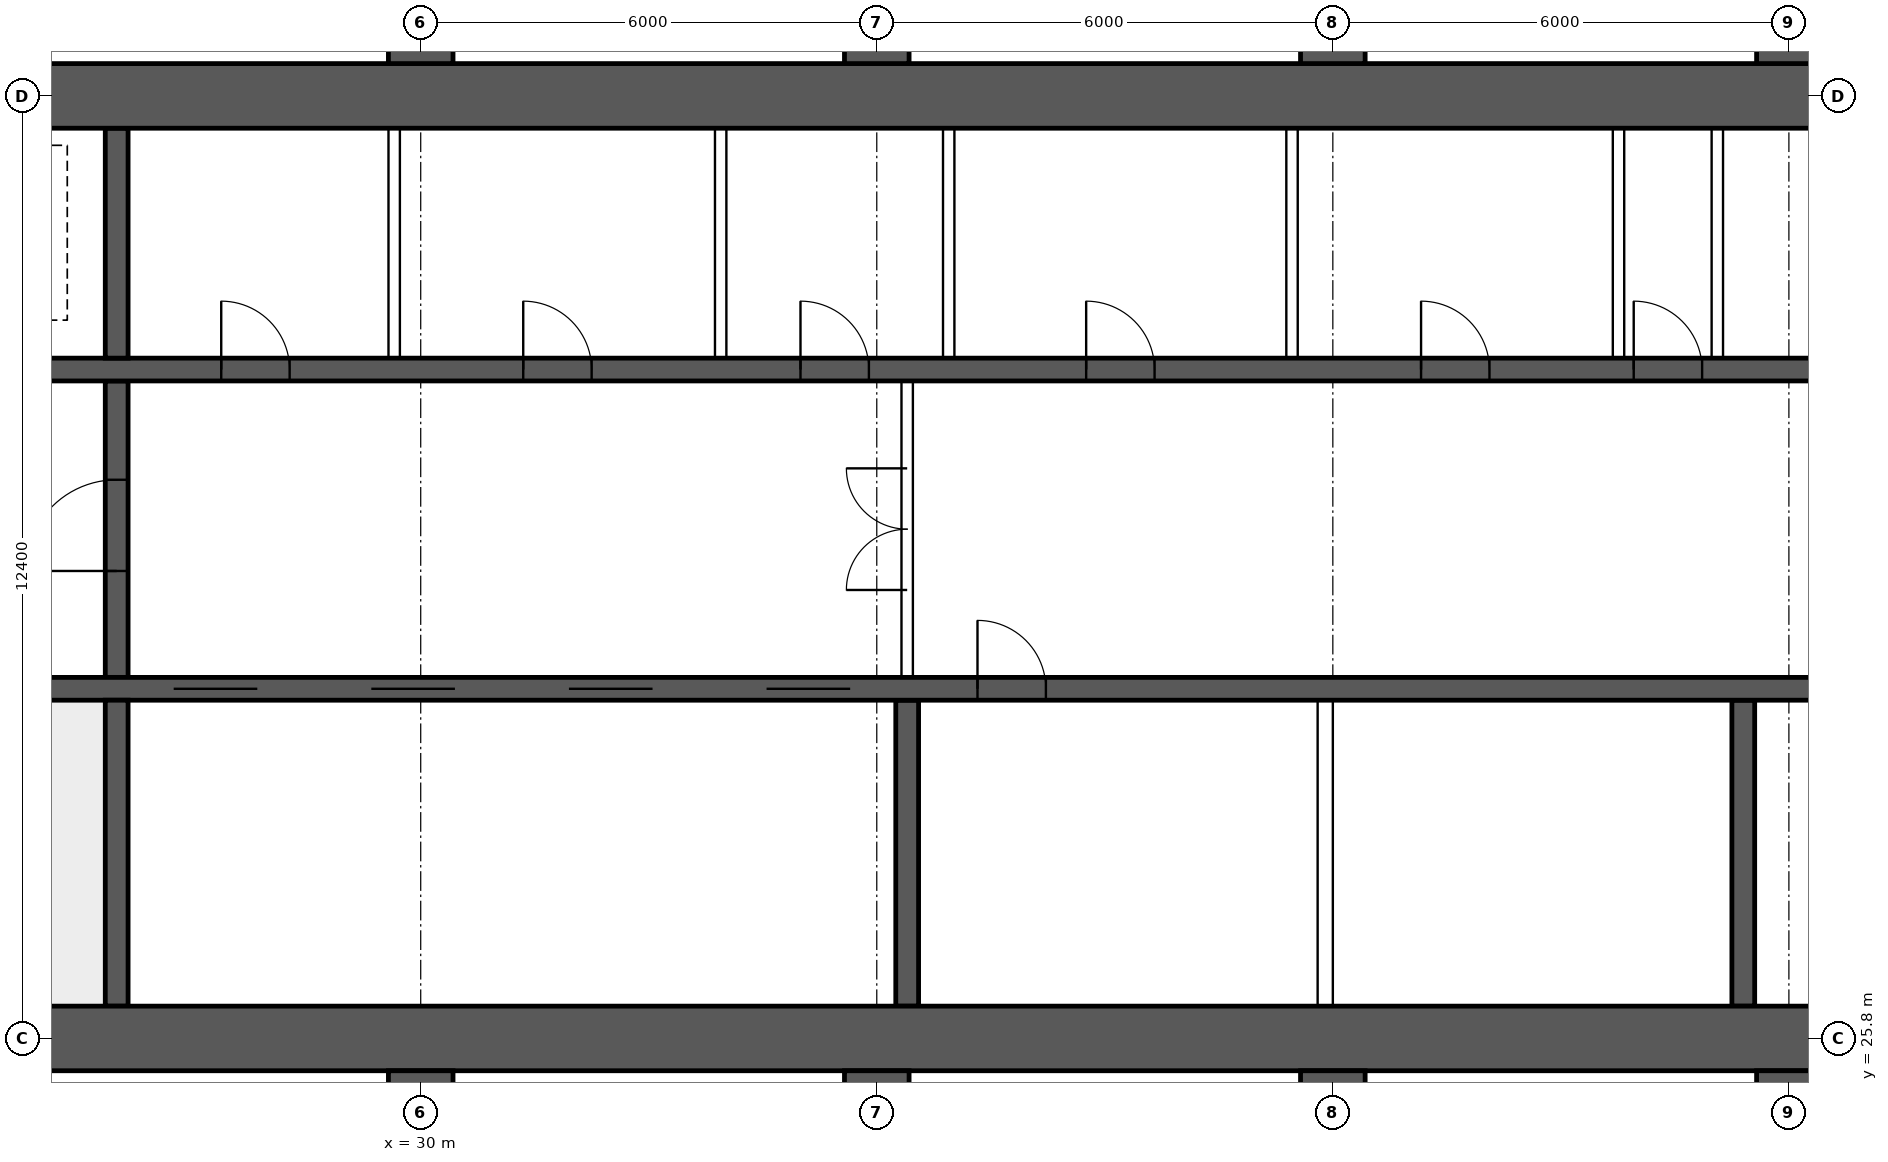
"""IFC4 building model, lengths in metres.
Left out: names, types, materials, properties, quantities, classifications, styles, units other than length and angle.
Written with IfcOpenShell. Run it as: python <this file> out.ifc"""

import sys

from ifc_helpers import new_model, si_unit, direction, frame, frame_2d, origin, place, context, subcontext, project, spatial, rectangle, extrude, element, fill, save


model = new_model("IFC4")
c1 = context("Model", 3, precision=1e-05, world=origin(), true_north=direction((0.0, 1.0)))
c2 = subcontext(c1, "Body", "Model", "MODEL_VIEW")
j1 = project(units=[si_unit("LENGTHUNIT", "METRE"), si_unit("PLANEANGLEUNIT", "RADIAN")], contexts=[c1])
p1 = place(None, origin())
s1 = spatial("IfcSite", under=j1, at=p1, CompositionType="ELEMENT")
p2 = place(p1, origin())
s2 = spatial("IfcBuilding", under=s1, at=p2, CompositionType="ELEMENT")
p3 = place(p2, frame((0.0, 0.0, 186.1)))
s3 = spatial("IfcBuildingStorey", under=s2, at=p3, CompositionType="ELEMENT", Elevation=186.1)
for number, where, z_axis, x_axis in (
    (1, (18.0, 25.8, 0.0), (0.0, 0.0, 1.0), (1.0, 0.0, 0.0)),
    (2, (18.0, 38.2, 0.0), (0.0, 0.0, 1.0), (1.0, 0.0, 0.0)),
):
    element("IfcWall", number, at=place(p3, frame(where, z_axis=z_axis, x_axis=x_axis)), inside=s3, PredefinedType="SHEAR", context=c2, shape_type="SweptSolid", body=[
        extrude(rectangle(XDim=48.0, YDim=0.85, at=frame_2d((24.0, 0.0))), origin(), (0.0, 0.0, 1.0), 3.75),
    ])
p4 = place(p3, frame((18.425, 30.4, 0.0), z_axis=(0.0, 0.0, 1.0), x_axis=(1.0, 0.0, 0.0)))
e3 = element("IfcWall", 3, at=p4, inside=s3, PredefinedType="SHEAR", context=c2, shape_type="SweptSolid", body=[
    extrude(rectangle(XDim=47.15, YDim=0.3, at=frame_2d((23.575, 0.0))), origin(), (0.0, 0.0, 1.0), 3.75),
])
p5 = place(p4, frame((0.4, 0.0, 0.0)))
e4 = element("IfcOpeningElement", 4, at=p5, cuts=e3, PredefinedType="OPENING", context=c2, shape_type="SweptSolid", body=[
    extrude(rectangle(XDim=1.0, YDim=2.1, at=frame_2d((0.5, 1.05))), frame((0.0, 0.16, 0.0), z_axis=(0.0, -1.0, 0.0), x_axis=(1.0, 0.0, 0.0)), (0.0, 0.0, 1.0), 0.32),
])
p6 = place(p4, frame((45.75, 0.0, 0.0)))
e5 = element("IfcOpeningElement", 5, at=p6, cuts=e3, PredefinedType="OPENING", context=c2, shape_type="SweptSolid", body=[
    extrude(rectangle(XDim=1.0, YDim=2.1, at=frame_2d((0.5, 1.05))), frame((0.0, 0.16, 0.0), z_axis=(0.0, -1.0, 0.0), x_axis=(1.0, 0.0, 0.0)), (0.0, 0.0, 1.0), 0.32),
])
p7 = place(p4, frame((8.325, 0.0, 0.0)))
e6 = element("IfcOpeningElement", 6, at=p7, cuts=e3, PredefinedType="OPENING", context=c2, shape_type="SweptSolid", body=[
    extrude(rectangle(XDim=1.1, YDim=2.1, at=frame_2d((0.55, 1.05))), frame((0.0, 0.16, 0.0), z_axis=(0.0, -1.0, 0.0), x_axis=(1.0, 0.0, 0.0)), (0.0, 0.0, 1.0), 0.32),
])
p8 = place(p4, frame((10.925, 0.0, 0.0)))
e7 = element("IfcOpeningElement", 7, at=p8, cuts=e3, PredefinedType="OPENING", context=c2, shape_type="SweptSolid", body=[
    extrude(rectangle(XDim=1.1, YDim=2.1, at=frame_2d((0.55, 1.05))), frame((0.0, 0.16, 0.0), z_axis=(0.0, -1.0, 0.0), x_axis=(1.0, 0.0, 0.0)), (0.0, 0.0, 1.0), 0.32),
])
p9 = place(p4, frame((13.525, 0.0, 0.0)))
e8 = element("IfcOpeningElement", 8, at=p9, cuts=e3, PredefinedType="OPENING", context=c2, shape_type="SweptSolid", body=[
    extrude(rectangle(XDim=1.1, YDim=2.1, at=frame_2d((0.55, 1.05))), frame((0.0, 0.16, 0.0), z_axis=(0.0, -1.0, 0.0), x_axis=(1.0, 0.0, 0.0)), (0.0, 0.0, 1.0), 0.32),
])
p10 = place(p4, frame((16.125, 0.0, 0.0)))
e9 = element("IfcOpeningElement", 9, at=p10, cuts=e3, PredefinedType="OPENING", context=c2, shape_type="SweptSolid", body=[
    extrude(rectangle(XDim=1.1, YDim=2.1, at=frame_2d((0.55, 1.05))), frame((0.0, 0.16, 0.0), z_axis=(0.0, -1.0, 0.0), x_axis=(1.0, 0.0, 0.0)), (0.0, 0.0, 1.0), 0.32),
])
p11 = place(p4, frame((18.9, 0.0, 0.0)))
e10 = element("IfcOpeningElement", 10, at=p11, cuts=e3, PredefinedType="OPENING", context=c2, shape_type="SweptSolid", body=[
    extrude(rectangle(XDim=0.9, YDim=2.1, at=frame_2d((0.45, 1.05))), frame((0.0, 0.16, 0.0), z_axis=(0.0, -1.0, 0.0), x_axis=(1.0, 0.0, 0.0)), (0.0, 0.0, 1.0), 0.32),
])
p12 = place(p4, frame((30.192, 0.0, 0.0)))
e11 = element("IfcOpeningElement", 11, at=p12, cuts=e3, PredefinedType="OPENING", context=c2, shape_type="SweptSolid", body=[
    extrude(rectangle(XDim=1.1, YDim=2.1, at=frame_2d((0.55, 1.05))), frame((0.0, 0.16, 0.0), z_axis=(0.0, -1.0, 0.0), x_axis=(1.0, 0.0, 0.0)), (0.0, 0.0, 1.0), 0.32),
])
p13 = place(p4, frame((33.725, 0.0, 0.0)))
e12 = element("IfcOpeningElement", 12, at=p13, cuts=e3, PredefinedType="OPENING", context=c2, shape_type="SweptSolid", body=[
    extrude(rectangle(XDim=1.1, YDim=2.1, at=frame_2d((0.55, 1.05))), frame((0.0, 0.16, 0.0), z_axis=(0.0, -1.0, 0.0), x_axis=(1.0, 0.0, 0.0)), (0.0, 0.0, 1.0), 0.32),
])
p14 = place(p4, frame((37.258, 0.0, 0.0)))
e13 = element("IfcOpeningElement", 13, at=p14, cuts=e3, PredefinedType="OPENING", context=c2, shape_type="SweptSolid", body=[
    extrude(rectangle(XDim=1.1, YDim=2.1, at=frame_2d((0.55, 1.05))), frame((0.0, 0.16, 0.0), z_axis=(0.0, -1.0, 0.0), x_axis=(1.0, 0.0, 0.0)), (0.0, 0.0, 1.0), 0.32),
])
p15 = place(p3, frame((18.425, 34.6, 0.0), z_axis=(0.0, 0.0, 1.0), x_axis=(1.0, 0.0, 0.0)))
e14 = element("IfcWall", 14, at=p15, inside=s3, PredefinedType="SHEAR", context=c2, shape_type="SweptSolid", body=[
    extrude(rectangle(XDim=47.15, YDim=0.3, at=frame_2d((23.575, 0.0))), origin(), (0.0, 0.0, 1.0), 3.75),
])
p16 = place(p15, frame((0.9, 0.0, 0.0)))
e15 = element("IfcOpeningElement", 15, at=p16, cuts=e14, PredefinedType="OPENING", context=c2, shape_type="SweptSolid", body=[
    extrude(rectangle(XDim=1.1, YDim=2.1, at=frame_2d((0.55, 1.05))), frame((0.0, 0.16, 0.0), z_axis=(0.0, -1.0, 0.0), x_axis=(1.0, 0.0, 0.0)), (0.0, 0.0, 1.0), 0.32),
])
p17 = place(p15, frame((45.15, 0.0, 0.0)))
e16 = element("IfcOpeningElement", 16, at=p17, cuts=e14, PredefinedType="OPENING", context=c2, shape_type="SweptSolid", body=[
    extrude(rectangle(XDim=1.1, YDim=2.1, at=frame_2d((0.55, 1.05))), frame((0.0, 0.16, 0.0), z_axis=(0.0, -1.0, 0.0), x_axis=(1.0, 0.0, 0.0)), (0.0, 0.0, 1.0), 0.32),
])
p18 = place(p15, frame((4.175, 0.0, 0.0)))
e17 = element("IfcOpeningElement", 17, at=p18, cuts=e14, PredefinedType="OPENING", context=c2, shape_type="SweptSolid", body=[
    extrude(rectangle(XDim=0.9, YDim=2.1, at=frame_2d((0.45, 1.05))), frame((0.0, 0.16, 0.0), z_axis=(0.0, -1.0, 0.0), x_axis=(1.0, 0.0, 0.0)), (0.0, 0.0, 1.0), 0.32),
])
p19 = place(p15, frame((42.075, 0.0, 0.0)))
e18 = element("IfcOpeningElement", 18, at=p19, cuts=e14, PredefinedType="OPENING", context=c2, shape_type="SweptSolid", body=[
    extrude(rectangle(XDim=0.9, YDim=2.1, at=frame_2d((0.45, 1.05))), frame((0.0, 0.16, 0.0), z_axis=(0.0, -1.0, 0.0), x_axis=(1.0, 0.0, 0.0)), (0.0, 0.0, 1.0), 0.32),
])
p20 = place(p15, frame((8.95, 0.0, 0.0)))
e19 = element("IfcOpeningElement", 19, at=p20, cuts=e14, PredefinedType="OPENING", context=c2, shape_type="SweptSolid", body=[
    extrude(rectangle(XDim=0.9, YDim=2.1, at=frame_2d((0.45, 1.05))), frame((0.0, 0.16, 0.0), z_axis=(0.0, -1.0, 0.0), x_axis=(1.0, 0.0, 0.0)), (0.0, 0.0, 1.0), 0.32),
])
p21 = place(p15, frame((12.924, 0.0, 0.0)))
e20 = element("IfcOpeningElement", 20, at=p21, cuts=e14, PredefinedType="OPENING", context=c2, shape_type="SweptSolid", body=[
    extrude(rectangle(XDim=0.9, YDim=2.1, at=frame_2d((0.45, 1.05))), frame((0.0, 0.16, 0.0), z_axis=(0.0, -1.0, 0.0), x_axis=(1.0, 0.0, 0.0)), (0.0, 0.0, 1.0), 0.32),
])
p22 = place(p15, frame((16.571, 0.0, 0.0)))
e21 = element("IfcOpeningElement", 21, at=p22, cuts=e14, PredefinedType="OPENING", context=c2, shape_type="SweptSolid", body=[
    extrude(rectangle(XDim=0.9, YDim=2.1, at=frame_2d((0.45, 1.05))), frame((0.0, 0.16, 0.0), z_axis=(0.0, -1.0, 0.0), x_axis=(1.0, 0.0, 0.0)), (0.0, 0.0, 1.0), 0.32),
])
p23 = place(p15, frame((20.33, 0.0, 0.0)))
e22 = element("IfcOpeningElement", 22, at=p23, cuts=e14, PredefinedType="OPENING", context=c2, shape_type="SweptSolid", body=[
    extrude(rectangle(XDim=0.9, YDim=2.1, at=frame_2d((0.45, 1.05))), frame((0.0, 0.16, 0.0), z_axis=(0.0, -1.0, 0.0), x_axis=(1.0, 0.0, 0.0)), (0.0, 0.0, 1.0), 0.32),
])
p24 = place(p15, frame((24.736, 0.0, 0.0)))
e23 = element("IfcOpeningElement", 23, at=p24, cuts=e14, PredefinedType="OPENING", context=c2, shape_type="SweptSolid", body=[
    extrude(rectangle(XDim=0.9, YDim=2.1, at=frame_2d((0.45, 1.05))), frame((0.0, 0.16, 0.0), z_axis=(0.0, -1.0, 0.0), x_axis=(1.0, 0.0, 0.0)), (0.0, 0.0, 1.0), 0.32),
])
p25 = place(p15, frame((27.533, 0.0, 0.0)))
e24 = element("IfcOpeningElement", 24, at=p25, cuts=e14, PredefinedType="OPENING", context=c2, shape_type="SweptSolid", body=[
    extrude(rectangle(XDim=0.9, YDim=2.1, at=frame_2d((0.45, 1.05))), frame((0.0, 0.16, 0.0), z_axis=(0.0, -1.0, 0.0), x_axis=(1.0, 0.0, 0.0)), (0.0, 0.0, 1.0), 0.32),
])
p26 = place(p15, frame((30.716, 0.0, 0.0)))
e25 = element("IfcOpeningElement", 25, at=p26, cuts=e14, PredefinedType="OPENING", context=c2, shape_type="SweptSolid", body=[
    extrude(rectangle(XDim=0.9, YDim=2.1, at=frame_2d((0.45, 1.05))), frame((0.0, 0.16, 0.0), z_axis=(0.0, -1.0, 0.0), x_axis=(1.0, 0.0, 0.0)), (0.0, 0.0, 1.0), 0.32),
])
p27 = place(p15, frame((34.667, 0.0, 0.0)))
e26 = element("IfcOpeningElement", 26, at=p27, cuts=e14, PredefinedType="OPENING", context=c2, shape_type="SweptSolid", body=[
    extrude(rectangle(XDim=0.9, YDim=2.1, at=frame_2d((0.45, 1.05))), frame((0.0, 0.16, 0.0), z_axis=(0.0, -1.0, 0.0), x_axis=(1.0, 0.0, 0.0)), (0.0, 0.0, 1.0), 0.32),
])
p28 = place(p15, frame((37.605, 0.0, 0.0)))
e27 = element("IfcOpeningElement", 27, at=p28, cuts=e14, PredefinedType="OPENING", context=c2, shape_type="SweptSolid", body=[
    extrude(rectangle(XDim=0.9, YDim=2.1, at=frame_2d((0.45, 1.05))), frame((0.0, 0.16, 0.0), z_axis=(0.0, -1.0, 0.0), x_axis=(1.0, 0.0, 0.0)), (0.0, 0.0, 1.0), 0.32),
])
p29 = place(p3, frame((26.0, 26.225, 0.0), z_axis=(0.0, 0.0, 1.0), x_axis=(0.0, 1.0, 0.0)))
e28 = element("IfcWall", 28, at=p29, inside=s3, PredefinedType="SHEAR", context=c2, shape_type="SweptSolid", body=[
    extrude(rectangle(XDim=4.025, YDim=0.3, at=frame_2d((2.012, 0.0))), origin(), (0.0, 0.0, 1.0), 3.75),
])
p30 = place(p3, frame((26.0, 30.55, 0.0), z_axis=(0.0, 0.0, 1.0), x_axis=(0.0, 1.0, 0.0)))
e29 = element("IfcWall", 29, at=p30, inside=s3, PredefinedType="SHEAR", context=c2, shape_type="SweptSolid", body=[
    extrude(rectangle(XDim=3.9, YDim=0.3, at=frame_2d((1.95, 0.0))), origin(), (0.0, 0.0, 1.0), 3.75),
])
p31 = place(p30, frame((1.4, 0.0, 0.0)))
e30 = element("IfcOpeningElement", 30, at=p31, cuts=e29, PredefinedType="OPENING", context=c2, shape_type="SweptSolid", body=[
    extrude(rectangle(XDim=1.2, YDim=2.1, at=frame_2d((0.6, 1.05))), frame((0.0, 0.16, 0.0), z_axis=(0.0, -1.0, 0.0), x_axis=(1.0, 0.0, 0.0)), (0.0, 0.0, 1.0), 0.32),
])
p32 = place(p3, frame((26.0, 34.75, 0.0), z_axis=(0.0, 0.0, 1.0), x_axis=(0.0, 1.0, 0.0)))
e31 = element("IfcWall", 31, at=p32, inside=s3, PredefinedType="SHEAR", context=c2, shape_type="SweptSolid", body=[
    extrude(rectangle(XDim=3.025, YDim=0.3, at=frame_2d((1.512, 0.0))), origin(), (0.0, 0.0, 1.0), 3.75),
])
for number, where, z_axis, x_axis in (
    (32, (36.4, 26.225, 0.0), (0.0, 0.0, 1.0), (0.0, 1.0, 0.0)),
    (33, (47.4, 26.225, 0.0), (0.0, 0.0, 1.0), (0.0, 1.0, 0.0)),
):
    element("IfcWall", number, at=place(p3, frame(where, z_axis=z_axis, x_axis=x_axis)), inside=s3, PredefinedType="SHEAR", context=c2, shape_type="SweptSolid", body=[
        extrude(rectangle(XDim=4.025, YDim=0.3, at=frame_2d((2.012, 0.0))), origin(), (0.0, 0.0, 1.0), 3.75),
    ])
for number, where, z_axis, x_axis in (
    (34, (30.0, 17.2, 0.0), (0.0, 0.0, 1.0), (0.0, 1.0, 0.0)),
    (35, (30.0, 38.625, 0.0), (0.0, 0.0, 1.0), (0.0, 1.0, 0.0)),
    (36, (36.0, 17.2, 0.0), (0.0, 0.0, 1.0), (0.0, 1.0, 0.0)),
    (37, (36.0, 38.625, 0.0), (0.0, 0.0, 1.0), (0.0, 1.0, 0.0)),
    (38, (42.0, 17.2, 0.0), (0.0, 0.0, 1.0), (0.0, 1.0, 0.0)),
    (39, (42.0, 38.625, 0.0), (0.0, 0.0, 1.0), (0.0, 1.0, 0.0)),
    (40, (48.0, 17.2, 0.0), (0.0, 0.0, 1.0), (0.0, 1.0, 0.0)),
    (41, (48.0, 38.625, 0.0), (0.0, 0.0, 1.0), (0.0, 1.0, 0.0)),
):
    element("IfcWall", number, at=place(p3, frame(where, z_axis=z_axis, x_axis=x_axis)), inside=s3, PredefinedType="SHEAR", context=c2, shape_type="SweptSolid", body=[
        extrude(rectangle(XDim=8.175, YDim=0.85, at=frame_2d((4.087, 0.0))), origin(), (0.0, 0.0, 1.0), 3.75),
    ])
p33 = place(p3, frame((36.4, 30.55, 0.0), z_axis=(0.0, 0.0, 1.0), x_axis=(0.0, 1.0, 0.0)))
e42 = element("IfcWall", 42, at=p33, inside=s3, PredefinedType="SOLIDWALL", context=c2, shape_type="SweptSolid", body=[
    extrude(rectangle(XDim=3.9, YDim=0.15, at=frame_2d((1.95, 0.0))), origin(), (0.0, 0.0, 1.0), 3.5),
])
p34 = place(p33, frame((1.15, 0.0, 0.0)))
e43 = element("IfcOpeningElement", 43, at=p34, cuts=e42, PredefinedType="OPENING", context=c2, shape_type="SweptSolid", body=[
    extrude(rectangle(XDim=1.6, YDim=2.1, at=frame_2d((0.8, 1.05))), frame((0.0, 0.085, 0.0), z_axis=(0.0, -1.0, 0.0), x_axis=(1.0, 0.0, 0.0)), (0.0, 0.0, 1.0), 0.17),
])
for number, where, z_axis, x_axis in (
    (44, (29.651, 34.75, 0.0), (0.0, 0.0, 1.0), (0.0, 1.0, 0.0)),
    (45, (33.946, 34.75, 0.0), (0.0, 0.0, 1.0), (0.0, 1.0, 0.0)),
    (46, (36.946, 34.75, 0.0), (0.0, 0.0, 1.0), (0.0, 1.0, 0.0)),
    (47, (41.463, 34.75, 0.0), (0.0, 0.0, 1.0), (0.0, 1.0, 0.0)),
    (48, (45.758, 34.75, 0.0), (0.0, 0.0, 1.0), (0.0, 1.0, 0.0)),
    (49, (47.058, 34.75, 0.0), (0.0, 0.0, 1.0), (0.0, 1.0, 0.0)),
):
    element("IfcWall", number, at=place(p3, frame(where, z_axis=z_axis, x_axis=x_axis)), inside=s3, PredefinedType="SOLIDWALL", context=c2, shape_type="SweptSolid", body=[
        extrude(rectangle(XDim=3.025, YDim=0.15, at=frame_2d((1.512, 0.0))), origin(), (0.0, 0.0, 1.0), 3.5),
    ])
p35 = place(p3, frame((41.9, 26.225, 0.0), z_axis=(0.0, 0.0, 1.0), x_axis=(0.0, 1.0, 0.0)))
e50 = element("IfcWall", 50, at=p35, inside=s3, PredefinedType="SOLIDWALL", context=c2, shape_type="SweptSolid", body=[
    extrude(rectangle(XDim=4.025, YDim=0.2, at=frame_2d((2.012, 0.0))), origin(), (0.0, 0.0, 1.0), 3.5),
])
p36 = place(p34, origin())
e51 = element("IfcDoor", 51, at=p36, inside=s3, OperationType="DOUBLE_DOOR_SINGLE_SWING", PredefinedType="DOOR", context=c2, shape_type="SweptSolid", body=[
    extrude(rectangle(XDim=1.6, YDim=2.1, at=frame_2d((0.8, 1.05))), frame((0.0, 0.025, 0.0), z_axis=(0.0, -1.0, 0.0), x_axis=(1.0, 0.0, 0.0)), (0.0, 0.0, 1.0), 0.05),
])
fill(e43, e51)
p37 = place(p31, origin())
e52 = element("IfcDoor", 52, at=p37, inside=s3, OperationType="SINGLE_SWING_LEFT", PredefinedType="DOOR", context=c2, shape_type="SweptSolid", body=[
    extrude(rectangle(XDim=1.2, YDim=2.1, at=frame_2d((0.6, 1.05))), frame((0.0, 0.025, 0.0), z_axis=(0.0, -1.0, 0.0), x_axis=(1.0, 0.0, 0.0)), (0.0, 0.0, 1.0), 0.05),
])
fill(e30, e52)
p38 = place(p20, origin())
e53 = element("IfcDoor", 53, at=p38, inside=s3, OperationType="SINGLE_SWING_LEFT", PredefinedType="DOOR", context=c2, shape_type="SweptSolid", body=[
    extrude(rectangle(XDim=0.9, YDim=2.1, at=frame_2d((0.45, 1.05))), frame((0.0, 0.025, 0.0), z_axis=(0.0, -1.0, 0.0), x_axis=(1.0, 0.0, 0.0)), (0.0, 0.0, 1.0), 0.05),
])
fill(e19, e53)
p39 = place(p21, origin())
e54 = element("IfcDoor", 54, at=p39, inside=s3, OperationType="SINGLE_SWING_LEFT", PredefinedType="DOOR", context=c2, shape_type="SweptSolid", body=[
    extrude(rectangle(XDim=0.9, YDim=2.1, at=frame_2d((0.45, 1.05))), frame((0.0, 0.025, 0.0), z_axis=(0.0, -1.0, 0.0), x_axis=(1.0, 0.0, 0.0)), (0.0, 0.0, 1.0), 0.05),
])
fill(e20, e54)
p40 = place(p22, origin())
e55 = element("IfcDoor", 55, at=p40, inside=s3, OperationType="SINGLE_SWING_LEFT", PredefinedType="DOOR", context=c2, shape_type="SweptSolid", body=[
    extrude(rectangle(XDim=0.9, YDim=2.1, at=frame_2d((0.45, 1.05))), frame((0.0, 0.025, 0.0), z_axis=(0.0, -1.0, 0.0), x_axis=(1.0, 0.0, 0.0)), (0.0, 0.0, 1.0), 0.05),
])
fill(e21, e55)
p41 = place(p23, origin())
e56 = element("IfcDoor", 56, at=p41, inside=s3, OperationType="SINGLE_SWING_LEFT", PredefinedType="DOOR", context=c2, shape_type="SweptSolid", body=[
    extrude(rectangle(XDim=0.9, YDim=2.1, at=frame_2d((0.45, 1.05))), frame((0.0, 0.025, 0.0), z_axis=(0.0, -1.0, 0.0), x_axis=(1.0, 0.0, 0.0)), (0.0, 0.0, 1.0), 0.05),
])
fill(e22, e56)
p42 = place(p24, origin())
e57 = element("IfcDoor", 57, at=p42, inside=s3, OperationType="SINGLE_SWING_LEFT", PredefinedType="DOOR", context=c2, shape_type="SweptSolid", body=[
    extrude(rectangle(XDim=0.9, YDim=2.1, at=frame_2d((0.45, 1.05))), frame((0.0, 0.025, 0.0), z_axis=(0.0, -1.0, 0.0), x_axis=(1.0, 0.0, 0.0)), (0.0, 0.0, 1.0), 0.05),
])
fill(e23, e57)
p43 = place(p25, origin())
e58 = element("IfcDoor", 58, at=p43, inside=s3, OperationType="SINGLE_SWING_LEFT", PredefinedType="DOOR", context=c2, shape_type="SweptSolid", body=[
    extrude(rectangle(XDim=0.9, YDim=2.1, at=frame_2d((0.45, 1.05))), frame((0.0, 0.025, 0.0), z_axis=(0.0, -1.0, 0.0), x_axis=(1.0, 0.0, 0.0)), (0.0, 0.0, 1.0), 0.05),
])
fill(e24, e58)
p44 = place(p7, origin())
e59 = element("IfcDoor", 59, at=p44, inside=s3, OperationType="DOUBLE_DOOR_SLIDING", PredefinedType="DOOR", context=c2, shape_type="SweptSolid", body=[
    extrude(rectangle(XDim=1.1, YDim=2.1, at=frame_2d((0.55, 1.05))), frame((0.0, 0.025, 0.0), z_axis=(0.0, -1.0, 0.0), x_axis=(1.0, 0.0, 0.0)), (0.0, 0.0, 1.0), 0.05),
])
fill(e6, e59)
p45 = place(p8, origin())
e60 = element("IfcDoor", 60, at=p45, inside=s3, OperationType="DOUBLE_DOOR_SLIDING", PredefinedType="DOOR", context=c2, shape_type="SweptSolid", body=[
    extrude(rectangle(XDim=1.1, YDim=2.1, at=frame_2d((0.55, 1.05))), frame((0.0, 0.025, 0.0), z_axis=(0.0, -1.0, 0.0), x_axis=(1.0, 0.0, 0.0)), (0.0, 0.0, 1.0), 0.05),
])
fill(e7, e60)
p46 = place(p9, origin())
e61 = element("IfcDoor", 61, at=p46, inside=s3, OperationType="DOUBLE_DOOR_SLIDING", PredefinedType="DOOR", context=c2, shape_type="SweptSolid", body=[
    extrude(rectangle(XDim=1.1, YDim=2.1, at=frame_2d((0.55, 1.05))), frame((0.0, 0.025, 0.0), z_axis=(0.0, -1.0, 0.0), x_axis=(1.0, 0.0, 0.0)), (0.0, 0.0, 1.0), 0.05),
])
fill(e8, e61)
p47 = place(p10, origin())
e62 = element("IfcDoor", 62, at=p47, inside=s3, OperationType="DOUBLE_DOOR_SLIDING", PredefinedType="DOOR", context=c2, shape_type="SweptSolid", body=[
    extrude(rectangle(XDim=1.1, YDim=2.1, at=frame_2d((0.55, 1.05))), frame((0.0, 0.025, 0.0), z_axis=(0.0, -1.0, 0.0), x_axis=(1.0, 0.0, 0.0)), (0.0, 0.0, 1.0), 0.05),
])
fill(e9, e62)
p48 = place(p11, origin())
e63 = element("IfcDoor", 63, at=p48, inside=s3, OperationType="SINGLE_SWING_LEFT", PredefinedType="DOOR", context=c2, shape_type="SweptSolid", body=[
    extrude(rectangle(XDim=0.9, YDim=2.1, at=frame_2d((0.45, 1.05))), frame((0.0, 0.025, 0.0), z_axis=(0.0, -1.0, 0.0), x_axis=(1.0, 0.0, 0.0)), (0.0, 0.0, 1.0), 0.05),
])
fill(e10, e63)
save(model, sys.argv[1])
